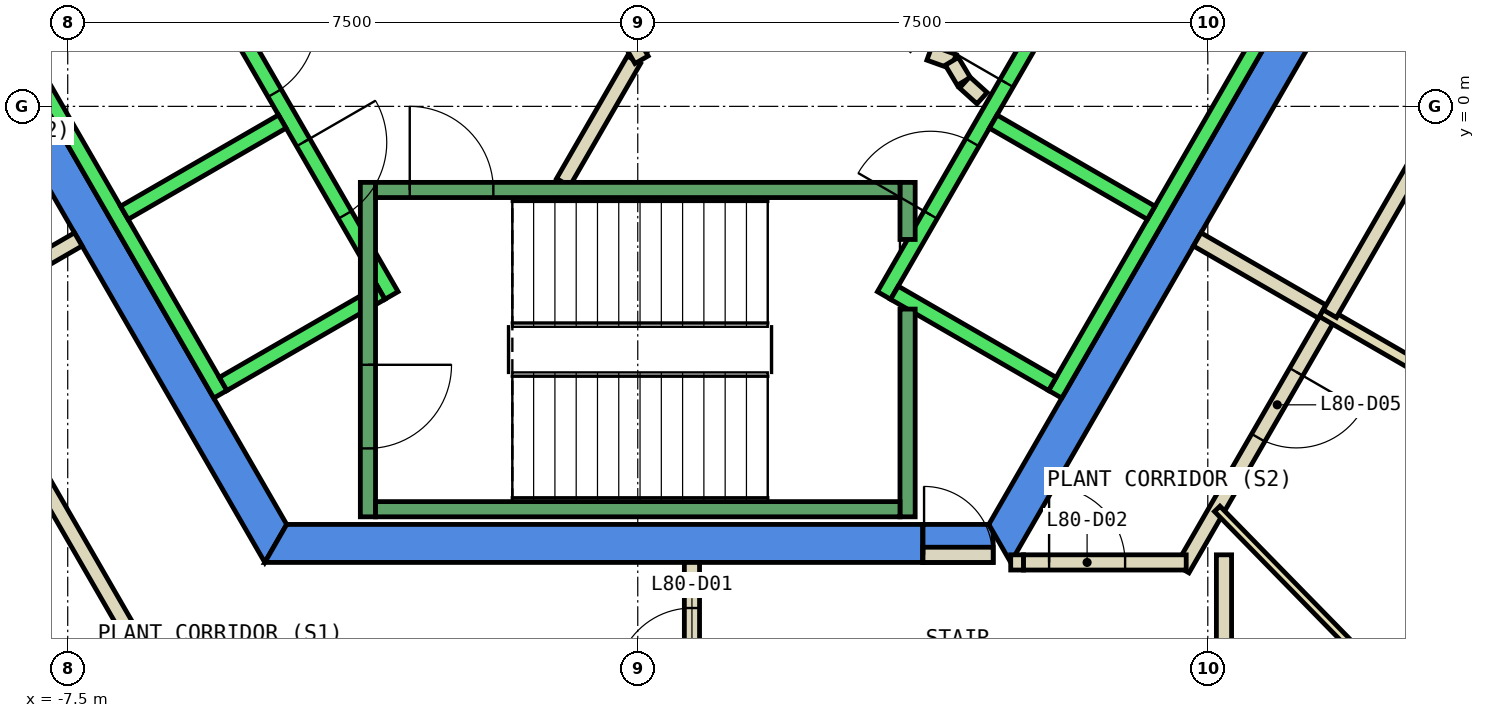
"""IFC4 building model, lengths in metres.
Left out: names, types, materials, properties, quantities, classifications, styles, units other than length and angle.
Written with IfcOpenShell. Run it as: python <this file> out.ifc"""

import sys

from ifc_helpers import new_model, si_unit, direction, frame, frame_2d, origin, place, context, subcontext, project, spatial, polyline, rectangle, outline, extrude, element, fill, save


model = new_model("IFC4")
c1 = context("Model", 3, precision=1e-05, world=origin(), true_north=direction((0.0, 1.0)))
c2 = subcontext(c1, "Body", "Model", "MODEL_VIEW")
j1 = project(units=[si_unit("LENGTHUNIT", "METRE"), si_unit("PLANEANGLEUNIT", "RADIAN")], contexts=[c1])
p1 = place(None, origin())
s1 = spatial("IfcSite", under=j1, at=p1, CompositionType="ELEMENT")
p2 = place(p1, origin())
s2 = spatial("IfcBuilding", under=s1, at=p2, CompositionType="ELEMENT")
p3 = place(p2, frame((0.0, 0.0, 340.4)))
s3 = spatial("IfcBuildingStorey", under=s2, at=p3, CompositionType="ELEMENT", Elevation=340.4)
p4 = place(p3, frame((0.0, 0.0, -0.45)))
e1 = element("IfcWall", 1, at=p4, inside=s3, PredefinedType="SHEAR", context=c2, shape_type="SweptSolid", body=[
    extrude(outline(polyline([(-9.815, 2.5), (-4.907, -6.0), (-4.619, -5.5), (-9.238, 2.5), (-9.815, 2.5)])), origin(), (0.0, 0.0, 1.0), 4.6),
])
p5 = place(p3, frame((0.0, 0.0, -0.45)))
e2 = element("IfcWall", 2, at=p5, inside=s3, PredefinedType="SHEAR", context=c2, shape_type="SweptSolid", body=[
    extrude(outline(polyline([(3.75, -6.0), (3.75, -5.5), (-4.619, -5.5), (-4.907, -6.0), (3.75, -6.0)])), origin(), (0.0, 0.0, 1.0), 4.6),
])
p6 = place(p3, frame((0.0, 0.0, 3.6)))
e3 = element("IfcWall", 3, at=p6, inside=s3, PredefinedType="SHEAR", context=c2, shape_type="SweptSolid", body=[
    extrude(outline(polyline([(4.676, -6.0), (4.676, -5.6), (4.619, -5.5), (3.75, -5.5), (3.75, -6.0), (4.676, -6.0)])), origin(), (0.0, 0.0, 1.0), 0.55),
])
p7 = place(p3, frame((0.0, 0.0, -0.45)))
e4 = element("IfcWall", 4, at=p7, inside=s3, PredefinedType="SHEAR", context=c2, shape_type="SweptSolid", body=[
    extrude(outline(polyline([(4.907, -6.0), (9.815, 2.5), (9.238, 2.5), (4.619, -5.5), (4.907, -6.0)])), origin(), (0.0, 0.0, 1.0), 4.6),
])
p8 = place(p3, frame((-0.982, -1.0, 0.0), z_axis=(0.0, 0.0, 1.0), x_axis=(0.50024047865, 0.865886518847, 0.0)))
e5 = element("IfcWall", 5, at=p8, inside=s3, PredefinedType="PARTITIONING", context=c2, shape_type="SweptSolid", body=[
    extrude(rectangle(XDim=1.863, YDim=0.2, at=frame_2d((0.931, 0.0))), origin(), (0.0, 0.0, 1.0), 4.15),
])
p9 = place(p3, frame((3.838, 0.702, 0.0), z_axis=(0.0, 0.0, 1.0), x_axis=(0.941035081519, -0.338308993895, 0.0)))
e6 = element("IfcWall", 6, at=p9, inside=s3, PredefinedType="PARTITIONING", context=c2, shape_type="SweptSolid", body=[
    extrude(rectangle(XDim=0.337, YDim=0.2, at=frame_2d((0.168, 0.0))), origin(), (0.0, 0.0, 1.0), 4.15),
])
p10 = place(p3, frame((4.132, 0.593, 0.0), z_axis=(0.0, 0.0, 1.0), x_axis=(0.513561617048, -0.858052717201, 0.0)))
e7 = element("IfcWall", 7, at=p10, inside=s3, PredefinedType="PARTITIONING", context=c2, shape_type="SweptSolid", body=[
    extrude(rectangle(XDim=0.308, YDim=0.2, at=frame_2d((0.154, 0.0))), origin(), (0.0, 0.0, 1.0), 4.15),
])
p11 = place(p3, frame((4.301, 0.315, 0.0), z_axis=(0.0, 0.0, 1.0), x_axis=(0.741798017506, -0.670623367639, 0.0)))
e8 = element("IfcWall", 8, at=p11, inside=s3, PredefinedType="PARTITIONING", context=c2, shape_type="SweptSolid", body=[
    extrude(rectangle(XDim=0.309, YDim=0.2, at=frame_2d((0.154, 0.0))), origin(), (0.0, 0.0, 1.0), 4.15),
])
p12 = place(p3, frame((-2.54, 5.1, 0.0), z_axis=(0.0, 0.0, 1.0), x_axis=(0.499925051871, -0.866068670783, 0.0)))
e9 = element("IfcWall", 9, at=p12, inside=s3, PredefinedType="PARTITIONING", context=c2, shape_type="SweptSolid", body=[
    extrude(rectangle(XDim=5.181, YDim=0.2, at=frame_2d((2.59, 0.0))), origin(), (0.0, 0.0, 1.0), 4.15),
])
p13 = place(p12, frame((2.04, 0.0, 0.0)))
e10 = element("IfcOpeningElement", 10, at=p13, cuts=e9, PredefinedType="OPENING", context=c2, shape_type="SweptSolid", body=[
    extrude(rectangle(XDim=1.0, YDim=2.1, at=frame_2d((0.5, 1.05))), frame((0.0, 0.11, 0.0), z_axis=(0.0, -1.0, 0.0), x_axis=(1.0, 0.0, 0.0)), (0.0, 0.0, 1.0), 0.22),
])
p14 = place(p3, frame((0.713, -7.9, 0.0), z_axis=(0.0, 0.0, 1.0), x_axis=(0.0, 1.0, 0.0)))
e11 = element("IfcWall", 11, at=p14, inside=s3, PredefinedType="PARTITIONING", context=c2, shape_type="SweptSolid", body=[
    extrude(rectangle(XDim=1.9, YDim=0.2, at=frame_2d((0.95, 0.0))), origin(), (0.0, 0.0, 1.0), 4.15),
])
p15 = place(p14, frame((0.3, 0.0, 0.0)))
e12 = element("IfcOpeningElement", 12, at=p15, cuts=e11, PredefinedType="OPENING", context=c2, shape_type="SweptSolid", body=[
    extrude(rectangle(XDim=1.0, YDim=2.1, at=frame_2d((0.5, 1.05))), frame((0.0, 0.11, 0.0), z_axis=(0.0, -1.0, 0.0), x_axis=(1.0, 0.0, 0.0)), (0.0, 0.0, 1.0), 0.22),
])
p16 = place(p3, frame((4.907, -6.0, 0.0), z_axis=(0.0, 0.0, 1.0), x_axis=(1.0, 0.0, 0.0)))
e13 = element("IfcWall", 13, at=p16, inside=s3, PredefinedType="PARTITIONING", context=c2, shape_type="SweptSolid", body=[
    extrude(rectangle(XDim=0.169, YDim=0.2, at=frame_2d((0.084, 0.0))), origin(), (0.0, 0.0, 1.0), 2.4),
])
p17 = place(p3, frame((7.713, -5.9, 0.0), z_axis=(0.0, 0.0, 1.0), x_axis=(0.0, -1.0, 0.0)))
e14 = element("IfcWall", 14, at=p17, inside=s3, PredefinedType="PARTITIONING", context=c2, shape_type="SweptSolid", body=[
    extrude(rectangle(XDim=2.4, YDim=0.2, at=frame_2d((1.2, 0.0))), origin(), (0.0, 0.0, 1.0), 4.15),
])
p18 = place(p3, frame((-6.112, -7.913, 0.0), z_axis=(0.0, 0.0, 1.0), x_axis=(-0.499915430684, 0.866074224396, 0.0)))
e15 = element("IfcWall", 15, at=p18, inside=s3, PredefinedType="PARTITIONING", context=c2, shape_type="SweptSolid", body=[
    extrude(rectangle(XDim=5.987, YDim=0.2, at=frame_2d((2.993, 0.0))), origin(), (0.0, 0.0, 1.0), 4.15),
])
p19 = place(p3, frame((-9.006, -2.7, 0.0), z_axis=(0.0, 0.0, 1.0), x_axis=(0.865980106173, 0.500078449558, 0.0)))
e16 = element("IfcWall", 16, at=p19, inside=s3, PredefinedType="PARTITIONING", context=c2, shape_type="SweptSolid", body=[
    extrude(rectangle(XDim=1.9, YDim=0.2, at=frame_2d((0.95, 0.0))), origin(), (0.0, 0.0, 1.0), 4.15),
])
p20 = place(p3, frame((9.106, -2.728, 0.0), z_axis=(0.0, 0.0, 1.0), x_axis=(-0.500132879116, -0.865948672398, 0.0)))
e17 = element("IfcWall", 17, at=p20, inside=s3, PredefinedType="PARTITIONING", context=c2, shape_type="SweptSolid", body=[
    extrude(rectangle(XDim=3.879, YDim=0.2, at=frame_2d((1.939, 0.0))), origin(), (0.0, 0.0, 1.0), 4.15),
])
p21 = place(p20, frame((0.884, 0.0, 0.0)))
e18 = element("IfcOpeningElement", 18, at=p21, cuts=e17, PredefinedType="OPENING", context=c2, shape_type="SweptSolid", body=[
    extrude(rectangle(XDim=1.0, YDim=2.1, at=frame_2d((0.5, 1.05))), frame((0.0, 0.11, 0.0), z_axis=(0.0, -1.0, 0.0), x_axis=(1.0, 0.0, 0.0)), (0.0, 0.0, 1.0), 0.22),
])
p22 = place(p3, frame((7.361, -1.75, 0.0), z_axis=(0.0, 0.0, 1.0), x_axis=(0.865980106173, -0.500078449558, 0.0)))
e19 = element("IfcWall", 19, at=p22, inside=s3, PredefinedType="PARTITIONING", context=c2, shape_type="SweptSolid", body=[
    extrude(rectangle(XDim=1.9, YDim=0.2, at=frame_2d((0.95, 0.0))), origin(), (0.0, 0.0, 1.0), 4.15),
])
p23 = place(p3, frame((7.624, -5.295, 0.0), z_axis=(0.0, 0.0, 1.0), x_axis=(0.699225895869, -0.714900794898, 0.0)))
e20 = element("IfcWall", 20, at=p23, inside=s3, PredefinedType="PARTITIONING", context=c2, shape_type="SweptSolid", body=[
    extrude(rectangle(XDim=11.681, YDim=0.1, at=frame_2d((5.841, 0.0))), origin(), (0.0, 0.0, 1.0), 4.15),
])
p24 = place(p3, frame((19.664, -8.853, 0.0), z_axis=(0.0, 0.0, 1.0), x_axis=(-0.866035935173, 0.499981758657, 0.0)))
e21 = element("IfcWall", 21, at=p24, inside=s3, PredefinedType="PARTITIONING", context=c2, shape_type="SweptSolid", body=[
    extrude(rectangle(XDim=12.307, YDim=0.15, at=frame_2d((6.153, 0.0))), origin(), (0.0, 0.0, 1.0), 4.15),
])
p25 = place(p3, frame((12.074, 2.413, 0.0), z_axis=(0.0, 0.0, 1.0), x_axis=(-0.499974029402, -0.866040397397, 0.0)))
e22 = element("IfcWall", 22, at=p25, inside=s3, PredefinedType="PARTITIONING", context=c2, shape_type="SweptSolid", body=[
    extrude(rectangle(XDim=5.936, YDim=0.2, at=frame_2d((2.968, 0.0))), origin(), (0.0, 0.0, 1.0), 4.15),
])
p26 = place(p3, frame((3.75, -5.9, 0.0), z_axis=(0.0, 0.0, 1.0), x_axis=(1.0, 0.0, 0.0)))
e23 = element("IfcWall", 23, at=p26, inside=s3, PredefinedType="PARTITIONING", context=c2, shape_type="SweptSolid", body=[
    extrude(rectangle(XDim=0.926, YDim=0.2, at=frame_2d((0.463, 0.0))), origin(), (0.0, 0.0, 1.0), 2.4),
])
p27 = place(p26, frame((0.017, 0.0, 0.0)))
e24 = element("IfcOpeningElement", 24, at=p27, cuts=e23, PredefinedType="OPENING", context=c2, shape_type="SweptSolid", body=[
    extrude(rectangle(XDim=0.9, YDim=2.1, at=frame_2d((0.45, 1.05))), frame((0.0, 0.11, 0.0), z_axis=(0.0, -1.0, 0.0), x_axis=(1.0, 0.0, 0.0)), (0.0, 0.0, 1.0), 0.22),
])
p28 = place(p3, frame((5.076, -6.0, 0.0), z_axis=(0.0, 0.0, 1.0), x_axis=(1.0, 0.0, 0.0)))
e25 = element("IfcWall", 25, at=p28, inside=s3, PredefinedType="PARTITIONING", context=c2, shape_type="SweptSolid", body=[
    extrude(rectangle(XDim=2.14, YDim=0.2, at=frame_2d((1.07, 0.0))), origin(), (0.0, 0.0, 1.0), 4.15),
])
p29 = place(p28, frame((0.336, 0.0, 0.0)))
e26 = element("IfcOpeningElement", 26, at=p29, cuts=e25, PredefinedType="OPENING", context=c2, shape_type="SweptSolid", body=[
    extrude(rectangle(XDim=1.0, YDim=2.1, at=frame_2d((0.5, 1.05))), frame((0.0, 0.11, 0.0), z_axis=(0.0, -1.0, 0.0), x_axis=(1.0, 0.0, 0.0)), (0.0, 0.0, 1.0), 0.22),
])
p30 = place(p3, frame((-5.94, 2.188, 0.0), z_axis=(0.0, 0.0, 1.0), x_axis=(0.500034260056, -0.866005622828, 0.0)))
e27 = element("IfcWall", 27, at=p30, inside=s3, PredefinedType="STANDARD", context=c2, shape_type="SweptSolid", body=[
    extrude(rectangle(XDim=5.399, YDim=0.2, at=frame_2d((2.7, 0.0))), origin(), (0.0, 0.0, 1.0), 4.15),
])
p31 = place(p30, frame((3.075, 0.0, 0.0)))
e28 = element("IfcOpeningElement", 28, at=p31, cuts=e27, PredefinedType="OPENING", context=c2, shape_type="SweptSolid", body=[
    extrude(rectangle(XDim=1.1, YDim=2.1, at=frame_2d((0.55, 1.05))), frame((0.0, 0.11, 0.0), z_axis=(0.0, -1.0, 0.0), x_axis=(1.0, 0.0, 0.0)), (0.0, 0.0, 1.0), 0.22),
])
p32 = place(p30, frame((1.225, 0.0, 0.0)))
e29 = element("IfcOpeningElement", 29, at=p32, cuts=e27, PredefinedType="OPENING", context=c2, shape_type="SweptSolid", body=[
    extrude(rectangle(XDim=1.1, YDim=2.1, at=frame_2d((0.55, 1.05))), frame((0.0, 0.11, 0.0), z_axis=(0.0, -1.0, 0.0), x_axis=(1.0, 0.0, 0.0)), (0.0, 0.0, 1.0), 0.22),
])
p33 = place(p3, frame((-8.192, 0.888, 0.0), z_axis=(0.0, 0.0, 1.0), x_axis=(0.500034260056, -0.866005622828, 0.0)))
e30 = element("IfcWall", 30, at=p33, inside=s3, PredefinedType="STANDARD", context=c2, shape_type="SweptSolid", body=[
    extrude(rectangle(XDim=5.399, YDim=0.2, at=frame_2d((2.7, 0.0))), origin(), (0.0, 0.0, 1.0), 4.15),
])
p34 = place(p3, frame((-4.677, -0.2, 0.0), z_axis=(0.0, 0.0, 1.0), x_axis=(-0.865973769406, -0.500089422704, 0.0)))
e31 = element("IfcWall", 31, at=p34, inside=s3, PredefinedType="STANDARD", context=c2, shape_type="SweptSolid", body=[
    extrude(rectangle(XDim=2.399, YDim=0.2, at=frame_2d((1.2, 0.0))), origin(), (0.0, 0.0, 1.0), 4.15),
])
p35 = place(p3, frame((-3.377, -2.452, 0.0), z_axis=(0.0, 0.0, 1.0), x_axis=(-0.865955154139, -0.50012165622, 0.0)))
e32 = element("IfcWall", 32, at=p35, inside=s3, PredefinedType="STANDARD", context=c2, shape_type="SweptSolid", body=[
    extrude(rectangle(XDim=2.4, YDim=0.2, at=frame_2d((1.2, 0.0))), origin(), (0.0, 0.0, 1.0), 4.15),
])
p36 = place(p3, frame((3.24, -2.488, 0.0), z_axis=(0.0, 0.0, 1.0), x_axis=(0.500034260056, 0.866005622828, 0.0)))
e33 = element("IfcWall", 33, at=p36, inside=s3, PredefinedType="STANDARD", context=c2, shape_type="SweptSolid", body=[
    extrude(rectangle(XDim=5.399, YDim=0.2, at=frame_2d((2.7, 0.0))), origin(), (0.0, 0.0, 1.0), 4.15),
])
p37 = place(p36, frame((3.225, 0.0, 0.0)))
e34 = element("IfcOpeningElement", 34, at=p37, cuts=e33, PredefinedType="OPENING", context=c2, shape_type="SweptSolid", body=[
    extrude(rectangle(XDim=1.1, YDim=2.1, at=frame_2d((0.55, 1.05))), frame((0.0, 0.11, 0.0), z_axis=(0.0, -1.0, 0.0), x_axis=(1.0, 0.0, 0.0)), (0.0, 0.0, 1.0), 0.22),
])
p38 = place(p36, frame((1.225, 0.0, 0.0)))
e35 = element("IfcOpeningElement", 35, at=p38, cuts=e33, PredefinedType="OPENING", context=c2, shape_type="SweptSolid", body=[
    extrude(rectangle(XDim=1.1, YDim=2.1, at=frame_2d((0.55, 1.05))), frame((0.0, 0.11, 0.0), z_axis=(0.0, -1.0, 0.0), x_axis=(1.0, 0.0, 0.0)), (0.0, 0.0, 1.0), 0.22),
])
p39 = place(p3, frame((5.492, -3.788, 0.0), z_axis=(0.0, 0.0, 1.0), x_axis=(0.500034260056, 0.866005622828, 0.0)))
e36 = element("IfcWall", 36, at=p39, inside=s3, PredefinedType="STANDARD", context=c2, shape_type="SweptSolid", body=[
    extrude(rectangle(XDim=5.399, YDim=0.2, at=frame_2d((2.7, 0.0))), origin(), (0.0, 0.0, 1.0), 4.15),
])
p40 = place(p3, frame((3.377, -2.452, 0.0), z_axis=(0.0, 0.0, 1.0), x_axis=(0.865955154139, -0.50012165622, 0.0)))
e37 = element("IfcWall", 37, at=p40, inside=s3, PredefinedType="STANDARD", context=c2, shape_type="SweptSolid", body=[
    extrude(rectangle(XDim=2.4, YDim=0.2, at=frame_2d((1.2, 0.0))), origin(), (0.0, 0.0, 1.0), 4.15),
])
p41 = place(p3, frame((4.677, -0.2, 0.0), z_axis=(0.0, 0.0, 1.0), x_axis=(0.865973769406, -0.500089422704, 0.0)))
e38 = element("IfcWall", 38, at=p41, inside=s3, PredefinedType="STANDARD", context=c2, shape_type="SweptSolid", body=[
    extrude(rectangle(XDim=2.399, YDim=0.2, at=frame_2d((1.2, 0.0))), origin(), (0.0, 0.0, 1.0), 4.15),
])
p42 = place(p3, frame((-3.55, -1.0, 0.0), z_axis=(0.0, 0.0, 1.0), x_axis=(0.0, -1.0, 0.0)))
e39 = element("IfcWall", 39, at=p42, inside=s3, PredefinedType="STANDARD", context=c2, shape_type="SweptSolid", body=[
    extrude(rectangle(XDim=4.4, YDim=0.2, at=frame_2d((2.2, 0.0))), origin(), (0.0, 0.0, 1.0), 4.15),
])
p43 = place(p42, frame((2.4, 0.0, 0.0)))
e40 = element("IfcOpeningElement", 40, at=p43, cuts=e39, PredefinedType="OPENING", context=c2, shape_type="SweptSolid", body=[
    extrude(rectangle(XDim=1.1, YDim=2.2, at=frame_2d((0.55, 1.1))), frame((0.0, 0.11, 0.0), z_axis=(0.0, -1.0, 0.0), x_axis=(1.0, 0.0, 0.0)), (0.0, 0.0, 1.0), 0.22),
])
p44 = place(p3, frame((3.55, -2.667, 0.0), z_axis=(0.0, 0.0, 1.0), x_axis=(0.0, -1.0, 0.0)))
e41 = element("IfcWall", 41, at=p44, inside=s3, PredefinedType="STANDARD", context=c2, shape_type="SweptSolid", body=[
    extrude(rectangle(XDim=2.733, YDim=0.2, at=frame_2d((1.366, 0.0))), origin(), (0.0, 0.0, 1.0), 4.15),
])
p45 = place(p3, frame((3.55, -1.0, 0.0), z_axis=(0.0, 0.0, 1.0), x_axis=(0.0, -1.0, 0.0)))
e42 = element("IfcWall", 42, at=p45, inside=s3, PredefinedType="STANDARD", context=c2, shape_type="SweptSolid", body=[
    extrude(rectangle(XDim=0.751, YDim=0.2, at=frame_2d((0.375, 0.0))), origin(), (0.0, 0.0, 1.0), 4.15),
])
p46 = place(p3, frame((-3.45, -1.1, 0.0), z_axis=(0.0, 0.0, 1.0), x_axis=(1.0, 0.0, 0.0)))
e43 = element("IfcWall", 43, at=p46, inside=s3, PredefinedType="STANDARD", context=c2, shape_type="SweptSolid", body=[
    extrude(rectangle(XDim=6.9, YDim=0.2, at=frame_2d((3.45, 0.0))), origin(), (0.0, 0.0, 1.0), 4.15),
])
p47 = place(p46, frame((0.45, 0.0, 0.0)))
e44 = element("IfcOpeningElement", 44, at=p47, cuts=e43, PredefinedType="OPENING", context=c2, shape_type="SweptSolid", body=[
    extrude(rectangle(XDim=1.1, YDim=2.2, at=frame_2d((0.55, 1.1))), frame((0.0, 0.11, 0.0), z_axis=(0.0, -1.0, 0.0), x_axis=(1.0, 0.0, 0.0)), (0.0, 0.0, 1.0), 0.22),
])
p48 = place(p3, frame((-3.45, -5.3, 0.0), z_axis=(0.0, 0.0, 1.0), x_axis=(1.0, 0.0, 0.0)))
e45 = element("IfcWall", 45, at=p48, inside=s3, PredefinedType="STANDARD", context=c2, shape_type="SweptSolid", body=[
    extrude(rectangle(XDim=6.9, YDim=0.2, at=frame_2d((3.45, 0.0))), origin(), (0.0, 0.0, 1.0), 4.15),
])
p49 = place(p15, origin())
e46 = element("IfcDoor", 46, at=p49, inside=s3, OperationType="SINGLE_SWING_LEFT", PredefinedType="DOOR", context=c2, shape_type="SweptSolid", body=[
    extrude(rectangle(XDim=1.0, YDim=2.1, at=frame_2d((0.5, 1.05))), frame((0.0, 0.025, 0.0), z_axis=(0.0, -1.0, 0.0), x_axis=(1.0, 0.0, 0.0)), (0.0, 0.0, 1.0), 0.05),
])
fill(e12, e46)
p50 = place(p29, origin())
e47 = element("IfcDoor", 47, at=p50, inside=s3, OperationType="SINGLE_SWING_RIGHT", PredefinedType="DOOR", context=c2, shape_type="SweptSolid", body=[
    extrude(rectangle(XDim=1.0, YDim=2.1, at=frame_2d((0.5, 1.05))), frame((0.0, 0.025, 0.0), z_axis=(0.0, -1.0, 0.0), x_axis=(1.0, 0.0, 0.0)), (0.0, 0.0, 1.0), 0.05),
])
fill(e26, e47)
p51 = place(p21, origin())
e48 = element("IfcDoor", 48, at=p51, inside=s3, OperationType="SINGLE_SWING_LEFT", PredefinedType="DOOR", context=c2, shape_type="SweptSolid", body=[
    extrude(rectangle(XDim=1.0, YDim=2.1, at=frame_2d((0.5, 1.05))), frame((0.0, 0.025, 0.0), z_axis=(0.0, -1.0, 0.0), x_axis=(1.0, 0.0, 0.0)), (0.0, 0.0, 1.0), 0.05),
])
fill(e18, e48)
p52 = place(p27, origin())
e49 = element("IfcDoor", 49, at=p52, inside=s3, OperationType="SINGLE_SWING_LEFT", PredefinedType="DOOR", context=c2, shape_type="SweptSolid", body=[
    extrude(rectangle(XDim=0.9, YDim=2.1, at=frame_2d((0.45, 1.05))), frame((0.0, 0.025, 0.0), z_axis=(0.0, -1.0, 0.0), x_axis=(1.0, 0.0, 0.0)), (0.0, 0.0, 1.0), 0.05),
])
fill(e24, e49)
p53 = place(p37, origin())
e50 = element("IfcDoor", 50, at=p53, inside=s3, OperationType="SLIDING_TO_LEFT", PredefinedType="DOOR", context=c2, shape_type="SweptSolid", body=[
    extrude(rectangle(XDim=1.1, YDim=2.1, at=frame_2d((0.55, 1.05))), frame((0.0, 0.025, 0.0), z_axis=(0.0, -1.0, 0.0), x_axis=(1.0, 0.0, 0.0)), (0.0, 0.0, 1.0), 0.05),
])
fill(e34, e50)
p54 = place(p31, origin())
e51 = element("IfcDoor", 51, at=p54, inside=s3, OperationType="SLIDING_TO_LEFT", PredefinedType="DOOR", context=c2, shape_type="SweptSolid", body=[
    extrude(rectangle(XDim=1.1, YDim=2.1, at=frame_2d((0.55, 1.05))), frame((0.0, 0.025, 0.0), z_axis=(0.0, -1.0, 0.0), x_axis=(1.0, 0.0, 0.0)), (0.0, 0.0, 1.0), 0.05),
])
fill(e28, e51)
p55 = place(p38, origin())
e52 = element("IfcDoor", 52, at=p55, inside=s3, OperationType="SLIDING_TO_LEFT", PredefinedType="DOOR", context=c2, shape_type="SweptSolid", body=[
    extrude(rectangle(XDim=1.1, YDim=2.1, at=frame_2d((0.55, 1.05))), frame((0.0, 0.025, 0.0), z_axis=(0.0, -1.0, 0.0), x_axis=(1.0, 0.0, 0.0)), (0.0, 0.0, 1.0), 0.05),
])
fill(e35, e52)
p56 = place(p32, origin())
e53 = element("IfcDoor", 53, at=p56, inside=s3, OperationType="SLIDING_TO_LEFT", PredefinedType="DOOR", context=c2, shape_type="SweptSolid", body=[
    extrude(rectangle(XDim=1.1, YDim=2.1, at=frame_2d((0.55, 1.05))), frame((0.0, 0.025, 0.0), z_axis=(0.0, -1.0, 0.0), x_axis=(1.0, 0.0, 0.0)), (0.0, 0.0, 1.0), 0.05),
])
fill(e29, e53)
p57 = place(p47, origin())
e54 = element("IfcDoor", 54, at=p57, inside=s3, OperationType="SINGLE_SWING_LEFT", PredefinedType="DOOR", context=c2, shape_type="SweptSolid", body=[
    extrude(rectangle(XDim=1.1, YDim=2.2, at=frame_2d((0.55, 1.1))), frame((0.0, 0.025, 0.0), z_axis=(0.0, -1.0, 0.0), x_axis=(1.0, 0.0, 0.0)), (0.0, 0.0, 1.0), 0.05),
])
fill(e44, e54)
p58 = place(p43, origin())
e55 = element("IfcDoor", 55, at=p58, inside=s3, OperationType="SINGLE_SWING_LEFT", PredefinedType="DOOR", context=c2, shape_type="SweptSolid", body=[
    extrude(rectangle(XDim=1.1, YDim=2.2, at=frame_2d((0.55, 1.1))), frame((0.0, 0.025, 0.0), z_axis=(0.0, -1.0, 0.0), x_axis=(1.0, 0.0, 0.0)), (0.0, 0.0, 1.0), 0.05),
])
fill(e40, e55)
save(model, sys.argv[1])
